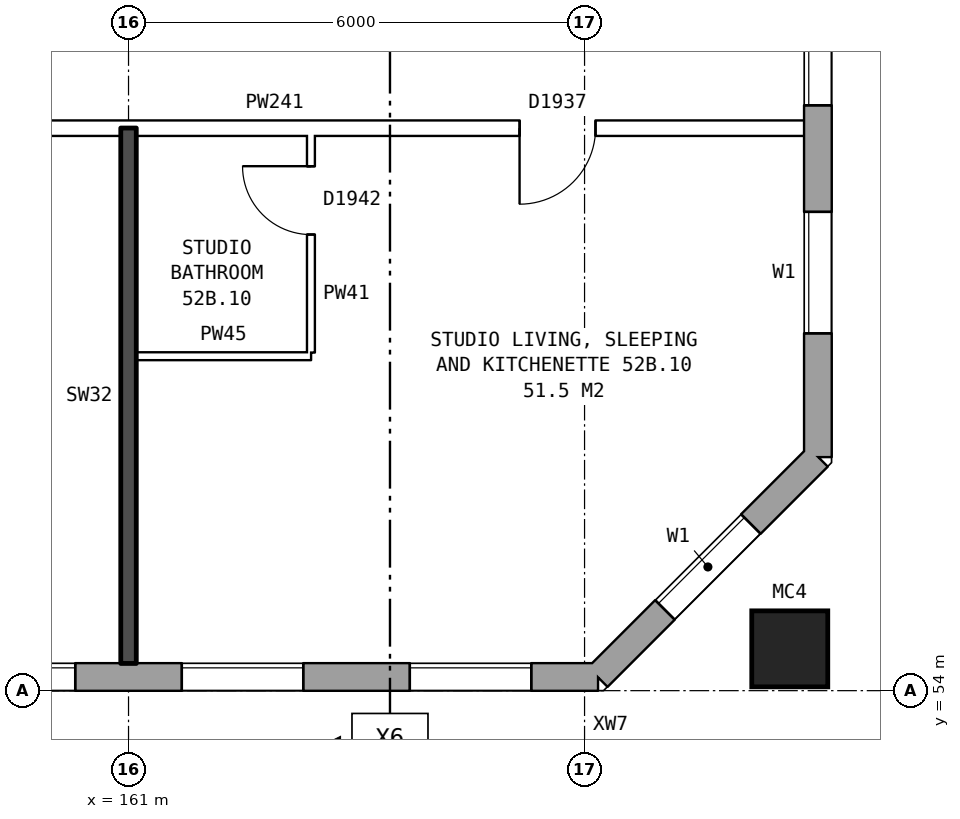
"""IFC4 building model, lengths in metres.
Left out: names, types, materials, properties, quantities, classifications, styles, units other than length and angle.
Written with IfcOpenShell. Run it as: python <this file> out.ifc"""

import sys

from ifc_helpers import new_model, si_unit, direction, frame, frame_2d, origin, origin_2d, place, context, subcontext, project, spatial, rectangle, hollow_rectangle, extrude, element, fill, save


model = new_model("IFC4")
c1 = context("Model", 3, precision=1e-05, world=origin(), true_north=direction((0.0, 1.0)))
c2 = subcontext(c1, "Body", "Model", "MODEL_VIEW")
j1 = project(units=[si_unit("LENGTHUNIT", "METRE"), si_unit("PLANEANGLEUNIT", "RADIAN")], contexts=[c1])
p1 = place(None, origin())
s1 = spatial("IfcSite", under=j1, at=p1, CompositionType="ELEMENT")
p2 = place(p1, origin())
s2 = spatial("IfcBuilding", under=s1, at=p2, CompositionType="ELEMENT")
p3 = place(p2, frame((0.0, 0.0, 185.1)))
s3 = spatial("IfcBuildingStorey", under=s2, at=p3, CompositionType="ELEMENT", Elevation=185.1)
p4 = place(p3, frame((169.7, 54.55, 0.0), z_axis=(0.0, 0.0, 1.0), x_axis=(1.0, 0.0, 0.0)))
e1 = element("IfcColumn", 1, at=p4, inside=s3, PredefinedType="COLUMN", context=c2, shape_type="SweptSolid", body=[
    extrude(hollow_rectangle(XDim=1.0, YDim=1.0, WallThickness=0.055, at=origin_2d()), origin(), (0.0, 0.0, 1.0), 3.1),
])
p5 = place(p3, frame((134.075, 54.18, 0.0), z_axis=(0.0, 0.0, 1.0), x_axis=(1.0, 0.0, 0.0)))
e2 = element("IfcWall", 2, at=p5, inside=s3, PredefinedType="STANDARD", context=c2, shape_type="SweptSolid", body=[
    extrude(rectangle(XDim=33.101, YDim=0.36, at=frame_2d((16.55, 0.0))), origin(), (0.0, 0.0, 1.0), 2.85),
])
p6 = place(p5, frame((0.625, 0.0, 0.8)))
e3 = element("IfcOpeningElement", 3, at=p6, cuts=e2, PredefinedType="OPENING", context=c2, shape_type="SweptSolid", body=[
    extrude(rectangle(XDim=1.6, YDim=1.8, at=frame_2d((0.8, 0.9))), frame((0.0, 0.19, 0.0), z_axis=(0.0, -1.0, 0.0), x_axis=(1.0, 0.0, 0.0)), (0.0, 0.0, 1.0), 0.38),
])
p7 = place(p5, frame((3.625, 0.0, 0.8)))
e4 = element("IfcOpeningElement", 4, at=p7, cuts=e2, PredefinedType="OPENING", context=c2, shape_type="SweptSolid", body=[
    extrude(rectangle(XDim=1.6, YDim=1.8, at=frame_2d((0.8, 0.9))), frame((0.0, 0.19, 0.0), z_axis=(0.0, -1.0, 0.0), x_axis=(1.0, 0.0, 0.0)), (0.0, 0.0, 1.0), 0.38),
])
p8 = place(p5, frame((6.625, 0.0, 0.8)))
e5 = element("IfcOpeningElement", 5, at=p8, cuts=e2, PredefinedType="OPENING", context=c2, shape_type="SweptSolid", body=[
    extrude(rectangle(XDim=1.6, YDim=1.8, at=frame_2d((0.8, 0.9))), frame((0.0, 0.19, 0.0), z_axis=(0.0, -1.0, 0.0), x_axis=(1.0, 0.0, 0.0)), (0.0, 0.0, 1.0), 0.38),
])
p9 = place(p5, frame((9.125, 0.0, 1.65)))
e6 = element("IfcOpeningElement", 6, at=p9, cuts=e2, PredefinedType="OPENING", context=c2, shape_type="SweptSolid", body=[
    extrude(rectangle(XDim=0.6, YDim=0.9, at=frame_2d((0.3, 0.45))), frame((0.0, 0.19, 0.0), z_axis=(0.0, -1.0, 0.0), x_axis=(1.0, 0.0, 0.0)), (0.0, 0.0, 1.0), 0.38),
])
p10 = place(p5, frame((12.625, 0.0, 0.8)))
e7 = element("IfcOpeningElement", 7, at=p10, cuts=e2, PredefinedType="OPENING", context=c2, shape_type="SweptSolid", body=[
    extrude(rectangle(XDim=1.6, YDim=1.8, at=frame_2d((0.8, 0.9))), frame((0.0, 0.19, 0.0), z_axis=(0.0, -1.0, 0.0), x_axis=(1.0, 0.0, 0.0)), (0.0, 0.0, 1.0), 0.38),
])
p11 = place(p5, frame((15.625, 0.0, 0.8)))
e8 = element("IfcOpeningElement", 8, at=p11, cuts=e2, PredefinedType="OPENING", context=c2, shape_type="SweptSolid", body=[
    extrude(rectangle(XDim=1.6, YDim=1.8, at=frame_2d((0.8, 0.9))), frame((0.0, 0.19, 0.0), z_axis=(0.0, -1.0, 0.0), x_axis=(1.0, 0.0, 0.0)), (0.0, 0.0, 1.0), 0.38),
])
p12 = place(p5, frame((18.625, 0.0, 0.8)))
e9 = element("IfcOpeningElement", 9, at=p12, cuts=e2, PredefinedType="OPENING", context=c2, shape_type="SweptSolid", body=[
    extrude(rectangle(XDim=1.6, YDim=1.8, at=frame_2d((0.8, 0.9))), frame((0.0, 0.19, 0.0), z_axis=(0.0, -1.0, 0.0), x_axis=(1.0, 0.0, 0.0)), (0.0, 0.0, 1.0), 0.38),
])
p13 = place(p5, frame((21.125, 0.0, 0.8)))
e10 = element("IfcOpeningElement", 10, at=p13, cuts=e2, PredefinedType="OPENING", context=c2, shape_type="SweptSolid", body=[
    extrude(rectangle(XDim=0.8, YDim=1.2, at=frame_2d((0.4, 0.6))), frame((0.0, 0.19, 0.0), z_axis=(0.0, -1.0, 0.0), x_axis=(1.0, 0.0, 0.0)), (0.0, 0.0, 1.0), 0.38),
])
p14 = place(p5, frame((24.625, 0.0, 0.8)))
e11 = element("IfcOpeningElement", 11, at=p14, cuts=e2, PredefinedType="OPENING", context=c2, shape_type="SweptSolid", body=[
    extrude(rectangle(XDim=1.6, YDim=1.8, at=frame_2d((0.8, 0.9))), frame((0.0, 0.19, 0.0), z_axis=(0.0, -1.0, 0.0), x_axis=(1.0, 0.0, 0.0)), (0.0, 0.0, 1.0), 0.38),
])
p15 = place(p5, frame((27.625, 0.0, 0.8)))
e12 = element("IfcOpeningElement", 12, at=p15, cuts=e2, PredefinedType="OPENING", context=c2, shape_type="SweptSolid", body=[
    extrude(rectangle(XDim=1.6, YDim=1.8, at=frame_2d((0.8, 0.9))), frame((0.0, 0.19, 0.0), z_axis=(0.0, -1.0, 0.0), x_axis=(1.0, 0.0, 0.0)), (0.0, 0.0, 1.0), 0.38),
])
p16 = place(p5, frame((30.625, 0.0, 0.8)))
e13 = element("IfcOpeningElement", 13, at=p16, cuts=e2, PredefinedType="OPENING", context=c2, shape_type="SweptSolid", body=[
    extrude(rectangle(XDim=1.6, YDim=1.8, at=frame_2d((0.8, 0.9))), frame((0.0, 0.19, 0.0), z_axis=(0.0, -1.0, 0.0), x_axis=(1.0, 0.0, 0.0)), (0.0, 0.0, 1.0), 0.38),
])
p17 = place(p5, frame((10.725, 0.0, 0.35)))
e14 = element("IfcOpeningElement", 14, at=p17, cuts=e2, PredefinedType="OPENING", context=c2, shape_type="SweptSolid", body=[
    extrude(rectangle(XDim=1.0, YDim=1.2, at=frame_2d((0.5, 0.6))), frame((0.0, 0.19, 0.0), z_axis=(0.0, -1.0, 0.0), x_axis=(1.0, 0.0, 0.0)), (0.0, 0.0, 1.0), 0.38),
])
p18 = place(p5, frame((23.525, 0.0, 1.4)))
e15 = element("IfcOpeningElement", 15, at=p18, cuts=e2, PredefinedType="OPENING", context=c2, shape_type="SweptSolid", body=[
    extrude(rectangle(XDim=0.8, YDim=1.2, at=frame_2d((0.4, 0.6))), frame((0.0, 0.19, 0.0), z_axis=(0.0, -1.0, 0.0), x_axis=(1.0, 0.0, 0.0)), (0.0, 0.0, 1.0), 0.38),
])
p19 = place(p3, frame((167.175, 54.18, 0.0), z_axis=(0.0, 0.0, 1.0), x_axis=(0.707106781187, 0.707106781187, 0.0)))
e16 = element("IfcWall", 16, at=p19, inside=s3, PredefinedType="STANDARD", context=c2, shape_type="SweptSolid", body=[
    extrude(rectangle(XDim=4.094, YDim=0.36, at=frame_2d((2.047, 0.0))), origin(), (0.0, 0.0, 1.0), 2.85),
])
p20 = place(p19, frame((1.247, 0.0, 0.8)))
e17 = element("IfcOpeningElement", 17, at=p20, cuts=e16, PredefinedType="OPENING", context=c2, shape_type="SweptSolid", body=[
    extrude(rectangle(XDim=1.6, YDim=1.8, at=frame_2d((0.8, 0.9))), frame((0.0, 0.19, 0.0), z_axis=(0.0, -1.0, 0.0), x_axis=(1.0, 0.0, 0.0)), (0.0, 0.0, 1.0), 0.38),
])
p21 = place(p3, frame((170.07, 57.075, 0.0), z_axis=(0.0, 0.0, 1.0), x_axis=(0.0, 1.0, 0.0)))
e18 = element("IfcWall", 18, at=p21, inside=s3, PredefinedType="STANDARD", context=c2, shape_type="SweptSolid", body=[
    extrude(rectangle(XDim=25.851, YDim=0.36, at=frame_2d((12.925, 0.0))), origin(), (0.0, 0.0, 1.0), 2.85),
])
p22 = place(p21, frame((1.625, 0.0, 0.8)))
e19 = element("IfcOpeningElement", 19, at=p22, cuts=e18, PredefinedType="OPENING", context=c2, shape_type="SweptSolid", body=[
    extrude(rectangle(XDim=1.6, YDim=1.8, at=frame_2d((0.8, 0.9))), frame((0.0, 0.19, 0.0), z_axis=(0.0, -1.0, 0.0), x_axis=(1.0, 0.0, 0.0)), (0.0, 0.0, 1.0), 0.38),
])
p23 = place(p21, frame((4.625, 0.0, 0.8)))
e20 = element("IfcOpeningElement", 20, at=p23, cuts=e18, PredefinedType="OPENING", context=c2, shape_type="SweptSolid", body=[
    extrude(rectangle(XDim=1.6, YDim=1.8, at=frame_2d((0.8, 0.9))), frame((0.0, 0.19, 0.0), z_axis=(0.0, -1.0, 0.0), x_axis=(1.0, 0.0, 0.0)), (0.0, 0.0, 1.0), 0.38),
])
p24 = place(p21, frame((8.025, 0.0, 1.7)))
e21 = element("IfcOpeningElement", 21, at=p24, cuts=e18, PredefinedType="OPENING", context=c2, shape_type="SweptSolid", body=[
    extrude(rectangle(XDim=1.0, YDim=0.9, at=frame_2d((0.5, 0.45))), frame((0.0, 0.19, 0.0), z_axis=(0.0, -1.0, 0.0), x_axis=(1.0, 0.0, 0.0)), (0.0, 0.0, 1.0), 0.38),
])
p25 = place(p21, frame((10.625, 0.0, 0.8)))
e22 = element("IfcOpeningElement", 22, at=p25, cuts=e18, PredefinedType="OPENING", context=c2, shape_type="SweptSolid", body=[
    extrude(rectangle(XDim=1.6, YDim=1.8, at=frame_2d((0.8, 0.9))), frame((0.0, 0.19, 0.0), z_axis=(0.0, -1.0, 0.0), x_axis=(1.0, 0.0, 0.0)), (0.0, 0.0, 1.0), 0.38),
])
p26 = place(p21, frame((13.625, 0.0, 0.8)))
e23 = element("IfcOpeningElement", 23, at=p26, cuts=e18, PredefinedType="OPENING", context=c2, shape_type="SweptSolid", body=[
    extrude(rectangle(XDim=1.6, YDim=1.8, at=frame_2d((0.8, 0.9))), frame((0.0, 0.19, 0.0), z_axis=(0.0, -1.0, 0.0), x_axis=(1.0, 0.0, 0.0)), (0.0, 0.0, 1.0), 0.38),
])
p27 = place(p21, frame((9.325, 0.0, 0.8)))
e24 = element("IfcOpeningElement", 24, at=p27, cuts=e18, PredefinedType="OPENING", context=c2, shape_type="SweptSolid", body=[
    extrude(rectangle(XDim=1.0, YDim=1.8, at=frame_2d((0.5, 0.9))), frame((0.0, 0.19, 0.0), z_axis=(0.0, -1.0, 0.0), x_axis=(1.0, 0.0, 0.0)), (0.0, 0.0, 1.0), 0.38),
])
p28 = place(p21, frame((19.625, 0.0, 0.8)))
e25 = element("IfcOpeningElement", 25, at=p28, cuts=e18, PredefinedType="OPENING", context=c2, shape_type="SweptSolid", body=[
    extrude(rectangle(XDim=1.6, YDim=1.8, at=frame_2d((0.8, 0.9))), frame((0.0, 0.19, 0.0), z_axis=(0.0, -1.0, 0.0), x_axis=(1.0, 0.0, 0.0)), (0.0, 0.0, 1.0), 0.38),
])
p29 = place(p21, frame((22.625, 0.0, 0.8)))
e26 = element("IfcOpeningElement", 26, at=p29, cuts=e18, PredefinedType="OPENING", context=c2, shape_type="SweptSolid", body=[
    extrude(rectangle(XDim=1.6, YDim=1.8, at=frame_2d((0.8, 0.9))), frame((0.0, 0.19, 0.0), z_axis=(0.0, -1.0, 0.0), x_axis=(1.0, 0.0, 0.0)), (0.0, 0.0, 1.0), 0.38),
])
p30 = place(p21, frame((12.525, 0.0, 0.8)))
e27 = element("IfcOpeningElement", 27, at=p30, cuts=e18, PredefinedType="OPENING", context=c2, shape_type="SweptSolid", body=[
    extrude(rectangle(XDim=0.8, YDim=1.8, at=frame_2d((0.4, 0.9))), frame((0.0, 0.19, 0.0), z_axis=(0.0, -1.0, 0.0), x_axis=(1.0, 0.0, 0.0)), (0.0, 0.0, 1.0), 0.38),
])
p31 = place(p21, frame((15.525, 0.0, 0.8)))
e28 = element("IfcOpeningElement", 28, at=p31, cuts=e18, PredefinedType="OPENING", context=c2, shape_type="SweptSolid", body=[
    extrude(rectangle(XDim=1.0, YDim=1.8, at=frame_2d((0.5, 0.9))), frame((0.0, 0.19, 0.0), z_axis=(0.0, -1.0, 0.0), x_axis=(1.0, 0.0, 0.0)), (0.0, 0.0, 1.0), 0.38),
])
p32 = place(p21, frame((16.825, 0.0, 1.7)))
e29 = element("IfcOpeningElement", 29, at=p32, cuts=e18, PredefinedType="OPENING", context=c2, shape_type="SweptSolid", body=[
    extrude(rectangle(XDim=1.0, YDim=0.9, at=frame_2d((0.5, 0.45))), frame((0.0, 0.19, 0.0), z_axis=(0.0, -1.0, 0.0), x_axis=(1.0, 0.0, 0.0)), (0.0, 0.0, 1.0), 0.38),
])
p33 = place(p3, frame((161.1, 58.4, 0.0), z_axis=(0.0, 0.0, 1.0), x_axis=(1.0, 0.0, 0.0)))
e30 = element("IfcWall", 30, at=p33, inside=s3, PredefinedType="PARTITIONING", context=c2, shape_type="SweptSolid", body=[
    extrude(rectangle(XDim=2.3, YDim=0.1, at=frame_2d((1.15, 0.0))), origin(), (0.0, 0.0, 1.0), 2.85),
])
p34 = place(p3, frame((155.1, 61.4, 0.0), z_axis=(0.0, 0.0, 1.0), x_axis=(1.0, 0.0, 0.0)))
e31 = element("IfcWall", 31, at=p34, inside=s3, PredefinedType="PARTITIONING", context=c2, shape_type="SweptSolid", body=[
    extrude(rectangle(XDim=14.79, YDim=0.2, at=frame_2d((7.395, 0.0))), origin(), (0.0, 0.0, 1.0), 2.85),
])
p35 = place(p34, frame((3.6, 0.0, 0.0)))
e32 = element("IfcOpeningElement", 32, at=p35, cuts=e31, PredefinedType="OPENING", context=c2, shape_type="SweptSolid", body=[
    extrude(rectangle(XDim=1.0, YDim=2.1, at=frame_2d((0.5, 1.05))), frame((0.0, 0.11, 0.0), z_axis=(0.0, -1.0, 0.0), x_axis=(1.0, 0.0, 0.0)), (0.0, 0.0, 1.0), 0.22),
])
p36 = place(p34, frame((11.045, 0.0, 0.0)))
e33 = element("IfcOpeningElement", 33, at=p36, cuts=e31, PredefinedType="OPENING", context=c2, shape_type="SweptSolid", body=[
    extrude(rectangle(XDim=1.0, YDim=2.1, at=frame_2d((0.5, 1.05))), frame((0.0, 0.11, 0.0), z_axis=(0.0, -1.0, 0.0), x_axis=(1.0, 0.0, 0.0)), (0.0, 0.0, 1.0), 0.22),
])
p37 = place(p3, frame((161.0, 54.36, 0.0), z_axis=(0.0, 0.0, 1.0), x_axis=(0.0, 1.0, 0.0)))
e34 = element("IfcWall", 34, at=p37, inside=s3, PredefinedType="SOLIDWALL", context=c2, shape_type="SweptSolid", body=[
    extrude(rectangle(XDim=7.04, YDim=0.2, at=frame_2d((3.52, 0.0))), origin(), (0.0, 0.0, 1.0), 2.85),
])
p38 = place(p3, frame((163.4, 58.45, 0.0), z_axis=(0.0, 0.0, 1.0), x_axis=(0.0, 1.0, 0.0)))
e35 = element("IfcWall", 35, at=p38, inside=s3, PredefinedType="PARTITIONING", context=c2, shape_type="SweptSolid", body=[
    extrude(rectangle(XDim=2.85, YDim=0.1, at=frame_2d((1.425, 0.0))), origin(), (0.0, 0.0, 1.0), 2.85),
])
p39 = place(p38, frame((1.55, 0.0, 0.0)))
e36 = element("IfcOpeningElement", 36, at=p39, cuts=e35, PredefinedType="OPENING", context=c2, shape_type="SweptSolid", body=[
    extrude(rectangle(XDim=0.9, YDim=2.1, at=frame_2d((0.45, 1.05))), frame((0.0, 0.06, 0.0), z_axis=(0.0, -1.0, 0.0), x_axis=(1.0, 0.0, 0.0)), (0.0, 0.0, 1.0), 0.12),
])
p40 = place(p14, origin())
e37 = element("IfcWindow", 37, at=p40, inside=s3, PartitioningType="SINGLE_PANEL", PredefinedType="WINDOW", context=c2, shape_type="SweptSolid", body=[
    extrude(rectangle(XDim=1.6, YDim=1.8, at=frame_2d((0.8, 0.9))), frame((0.0, 0.15, 0.0), z_axis=(0.0, -1.0, 0.0), x_axis=(1.0, 0.0, 0.0)), (0.0, 0.0, 1.0), 0.06),
])
fill(e11, e37)
p41 = place(p15, origin())
e38 = element("IfcWindow", 38, at=p41, inside=s3, PartitioningType="SINGLE_PANEL", PredefinedType="WINDOW", context=c2, shape_type="SweptSolid", body=[
    extrude(rectangle(XDim=1.6, YDim=1.8, at=frame_2d((0.8, 0.9))), frame((0.0, 0.15, 0.0), z_axis=(0.0, -1.0, 0.0), x_axis=(1.0, 0.0, 0.0)), (0.0, 0.0, 1.0), 0.06),
])
fill(e12, e38)
p42 = place(p16, origin())
e39 = element("IfcWindow", 39, at=p42, inside=s3, PartitioningType="SINGLE_PANEL", PredefinedType="WINDOW", context=c2, shape_type="SweptSolid", body=[
    extrude(rectangle(XDim=1.6, YDim=1.8, at=frame_2d((0.8, 0.9))), frame((0.0, 0.15, 0.0), z_axis=(0.0, -1.0, 0.0), x_axis=(1.0, 0.0, 0.0)), (0.0, 0.0, 1.0), 0.06),
])
fill(e13, e39)
p43 = place(p20, origin())
e40 = element("IfcWindow", 40, at=p43, inside=s3, PartitioningType="SINGLE_PANEL", PredefinedType="WINDOW", context=c2, shape_type="SweptSolid", body=[
    extrude(rectangle(XDim=1.6, YDim=1.8, at=frame_2d((0.8, 0.9))), frame((0.0, 0.15, 0.0), z_axis=(0.0, -1.0, 0.0), x_axis=(1.0, 0.0, 0.0)), (0.0, 0.0, 1.0), 0.06),
])
fill(e17, e40)
p44 = place(p22, origin())
e41 = element("IfcWindow", 41, at=p44, inside=s3, PartitioningType="SINGLE_PANEL", PredefinedType="WINDOW", context=c2, shape_type="SweptSolid", body=[
    extrude(rectangle(XDim=1.6, YDim=1.8, at=frame_2d((0.8, 0.9))), frame((0.0, 0.15, 0.0), z_axis=(0.0, -1.0, 0.0), x_axis=(1.0, 0.0, 0.0)), (0.0, 0.0, 1.0), 0.06),
])
fill(e19, e41)
p45 = place(p23, origin())
e42 = element("IfcWindow", 42, at=p45, inside=s3, PartitioningType="SINGLE_PANEL", PredefinedType="WINDOW", context=c2, shape_type="SweptSolid", body=[
    extrude(rectangle(XDim=1.6, YDim=1.8, at=frame_2d((0.8, 0.9))), frame((0.0, 0.15, 0.0), z_axis=(0.0, -1.0, 0.0), x_axis=(1.0, 0.0, 0.0)), (0.0, 0.0, 1.0), 0.06),
])
fill(e20, e42)
p46 = place(p36, frame((1.0, 0.0, 0.0), z_axis=(0.0, 0.0, 1.0), x_axis=(-1.0, 0.0, 0.0)))
e43 = element("IfcDoor", 43, at=p46, inside=s3, OperationType="SINGLE_SWING_RIGHT", PredefinedType="DOOR", context=c2, shape_type="SweptSolid", body=[
    extrude(rectangle(XDim=1.0, YDim=2.1, at=frame_2d((0.5, 1.05))), frame((0.0, 0.025, 0.0), z_axis=(0.0, -1.0, 0.0), x_axis=(1.0, 0.0, 0.0)), (0.0, 0.0, 1.0), 0.05),
])
fill(e33, e43)
p47 = place(p39, origin())
e44 = element("IfcDoor", 44, at=p47, inside=s3, OperationType="SINGLE_SWING_RIGHT", PredefinedType="DOOR", context=c2, shape_type="SweptSolid", body=[
    extrude(rectangle(XDim=0.9, YDim=2.1, at=frame_2d((0.45, 1.05))), frame((0.0, 0.025, 0.0), z_axis=(0.0, -1.0, 0.0), x_axis=(1.0, 0.0, 0.0)), (0.0, 0.0, 1.0), 0.05),
])
fill(e36, e44)
save(model, sys.argv[1])
